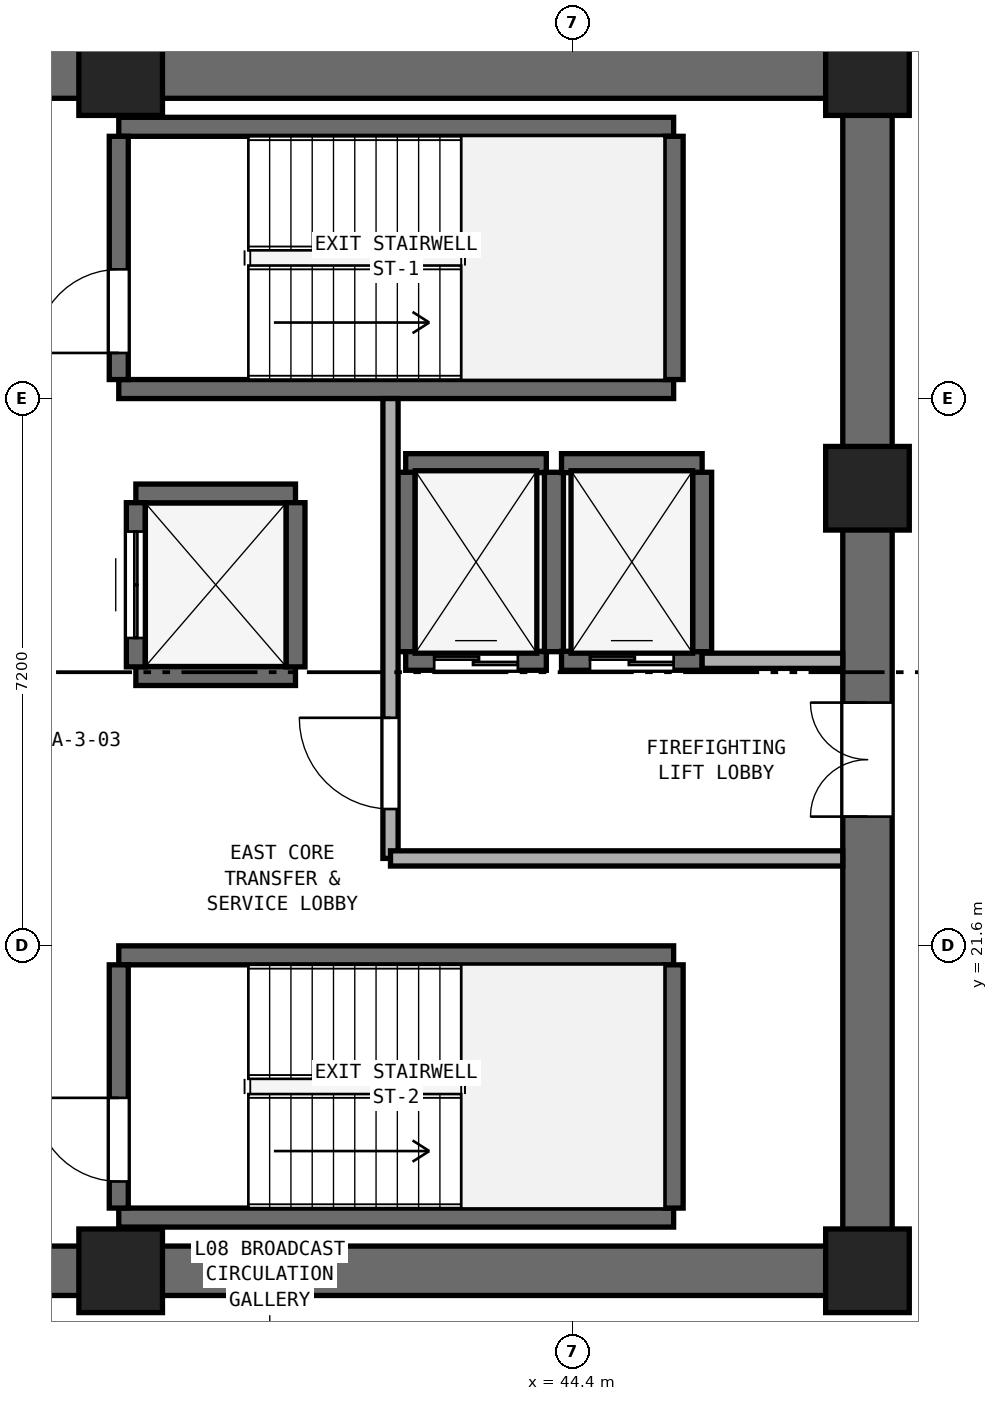
"""IFC4 building model, lengths in metres.
Left out: names, types, materials, properties, quantities, classifications, styles, units other than length and angle.
Written with IfcOpenShell. Run it as: python <this file> out.ifc"""

import sys

from ifc_helpers import new_model, si_unit, direction, frame, frame_2d, origin, origin_2d, place, context, subcontext, project, spatial, rectangle, extrude, element, fill, save


model = new_model("IFC4")
c1 = context("Model", 3, precision=1e-05, world=origin(), true_north=direction((0.0, 1.0)))
c2 = subcontext(c1, "Body", "Model", "MODEL_VIEW")
j1 = project(units=[si_unit("LENGTHUNIT", "METRE"), si_unit("PLANEANGLEUNIT", "RADIAN")], contexts=[c1])
p1 = place(None, origin())
s1 = spatial("IfcSite", under=j1, at=p1, CompositionType="ELEMENT")
p2 = place(p1, origin())
s2 = spatial("IfcBuilding", under=s1, at=p2, CompositionType="ELEMENT")
p3 = place(p2, frame((0.0, 0.0, 36.4)))
s3 = spatial("IfcBuildingStorey", under=s2, at=p3, CompositionType="ELEMENT", Elevation=36.4)
for number, where, z_axis, x_axis in (
    (1, (25.4, 17.325, 0.0), (0.0, 0.0, 1.0), (1.0, 0.0, 0.0)),
    (2, (25.4, 33.075, 0.0), (0.0, 0.0, 1.0), (1.0, 0.0, 0.0)),
):
    element("IfcWall", number, at=place(p3, frame(where, z_axis=z_axis, x_axis=x_axis)), inside=s3, PredefinedType="SHEAR", context=c2, shape_type="SweptSolid", body=[
        extrude(rectangle(XDim=23.2, YDim=0.65, at=frame_2d((11.6, 0.0))), origin(), (0.0, 0.0, 1.0), 3.525),
    ])
p4 = place(p3, frame((48.275, 17.65, 0.0), z_axis=(0.0, 0.0, 1.0), x_axis=(0.0, 1.0, 0.0)))
e3 = element("IfcWall", 3, at=p4, inside=s3, PredefinedType="SHEAR", context=c2, shape_type="SweptSolid", body=[
    extrude(rectangle(XDim=15.1, YDim=0.65, at=frame_2d((7.55, 0.0))), origin(), (0.0, 0.0, 1.0), 3.525),
])
p5 = place(p4, frame((5.65, 0.0, 0.0)))
e4 = element("IfcOpeningElement", 4, at=p5, cuts=e3, PredefinedType="OPENING", context=c2, shape_type="SweptSolid", body=[
    extrude(rectangle(XDim=1.5, YDim=2.15, at=frame_2d((0.75, 1.075))), frame((0.0, 0.335, 0.0), z_axis=(0.0, -1.0, 0.0), x_axis=(1.0, 0.0, 0.0)), (0.0, 0.0, 1.0), 0.67),
])
for number, where, z_axis, x_axis in (
    (5, (38.45, 17.325, 0.0), (0.0, 0.0, 1.0), (1.0, 0.0, 0.0)),
    (6, (48.275, 17.325, 0.0), (0.0, 0.0, 1.0), (1.0, 0.0, 0.0)),
    (7, (48.275, 27.62, 0.0), (0.0, 0.0, 1.0), (1.0, 0.0, 0.0)),
    (8, (48.275, 33.075, 0.0), (0.0, 0.0, 1.0), (1.0, 0.0, 0.0)),
    (9, (38.45, 33.075, 0.0), (0.0, 0.0, 1.0), (1.0, 0.0, 0.0)),
):
    element("IfcColumn", number, at=place(p3, frame(where, z_axis=z_axis, x_axis=x_axis)), inside=s3, PredefinedType="PILASTER", context=c2, shape_type="SweptSolid", body=[
        extrude(rectangle(XDim=1.1, YDim=1.1, at=origin_2d()), origin(), (0.0, 0.0, 1.0), 3.8),
    ])
for number, where, z_axis, x_axis in (
    (10, (38.425, 28.925, 0.0), (0.0, 0.0, 1.0), (1.0, 0.0, 0.0)),
    (11, (38.425, 32.375, 0.0), (0.0, 0.0, 1.0), (1.0, 0.0, 0.0)),
):
    element("IfcWall", number, at=place(p3, frame(where, z_axis=z_axis, x_axis=x_axis)), inside=s3, PredefinedType="SHEAR", context=c2, shape_type="SweptSolid", body=[
        extrude(rectangle(XDim=7.3, YDim=0.25, at=frame_2d((3.65, 0.0))), origin(), (0.0, 0.0, 1.0), 3.525),
    ])
p6 = place(p3, frame((38.425, 29.05, 0.0), z_axis=(0.0, 0.0, 1.0), x_axis=(0.0, 1.0, 0.0)))
e12 = element("IfcWall", 12, at=p6, inside=s3, PredefinedType="SHEAR", context=c2, shape_type="SweptSolid", body=[
    extrude(rectangle(XDim=3.2, YDim=0.25, at=frame_2d((1.6, 0.0))), origin(), (0.0, 0.0, 1.0), 3.525),
])
p7 = place(p6, frame((0.35, 0.0, 0.0)))
e13 = element("IfcOpeningElement", 13, at=p7, cuts=e12, PredefinedType="OPENING", context=c2, shape_type="SweptSolid", body=[
    extrude(rectangle(XDim=1.1, YDim=2.15, at=frame_2d((0.55, 1.075))), frame((0.0, 0.135, 0.0), z_axis=(0.0, -1.0, 0.0), x_axis=(1.0, 0.0, 0.0)), (0.0, 0.0, 1.0), 0.27),
])
p8 = place(p3, frame((45.725, 29.05, 0.0), z_axis=(0.0, 0.0, 1.0), x_axis=(0.0, 1.0, 0.0)))
e14 = element("IfcWall", 14, at=p8, inside=s3, PredefinedType="SHEAR", context=c2, shape_type="SweptSolid", body=[
    extrude(rectangle(XDim=3.2, YDim=0.25, at=frame_2d((1.6, 0.0))), origin(), (0.0, 0.0, 1.0), 3.525),
])
for number, where, z_axis, x_axis in (
    (15, (38.425, 18.025, 0.0), (0.0, 0.0, 1.0), (1.0, 0.0, 0.0)),
    (16, (38.425, 21.475, 0.0), (0.0, 0.0, 1.0), (1.0, 0.0, 0.0)),
):
    element("IfcWall", number, at=place(p3, frame(where, z_axis=z_axis, x_axis=x_axis)), inside=s3, PredefinedType="SHEAR", context=c2, shape_type="SweptSolid", body=[
        extrude(rectangle(XDim=7.3, YDim=0.25, at=frame_2d((3.65, 0.0))), origin(), (0.0, 0.0, 1.0), 3.525),
    ])
p9 = place(p3, frame((38.425, 18.15, 0.0), z_axis=(0.0, 0.0, 1.0), x_axis=(0.0, 1.0, 0.0)))
e17 = element("IfcWall", 17, at=p9, inside=s3, PredefinedType="SHEAR", context=c2, shape_type="SweptSolid", body=[
    extrude(rectangle(XDim=3.2, YDim=0.25, at=frame_2d((1.6, 0.0))), origin(), (0.0, 0.0, 1.0), 3.525),
])
p10 = place(p9, frame((0.35, 0.0, 0.0)))
e18 = element("IfcOpeningElement", 18, at=p10, cuts=e17, PredefinedType="OPENING", context=c2, shape_type="SweptSolid", body=[
    extrude(rectangle(XDim=1.1, YDim=2.15, at=frame_2d((0.55, 1.075))), frame((0.0, 0.135, 0.0), z_axis=(0.0, -1.0, 0.0), x_axis=(1.0, 0.0, 0.0)), (0.0, 0.0, 1.0), 0.27),
])
p11 = place(p3, frame((45.725, 18.15, 0.0), z_axis=(0.0, 0.0, 1.0), x_axis=(0.0, 1.0, 0.0)))
e19 = element("IfcWall", 19, at=p11, inside=s3, PredefinedType="SHEAR", context=c2, shape_type="SweptSolid", body=[
    extrude(rectangle(XDim=3.2, YDim=0.25, at=frame_2d((1.6, 0.0))), origin(), (0.0, 0.0, 1.0), 3.525),
])
p12 = place(p3, frame((42.2, 25.35, 0.0), z_axis=(0.0, 0.0, 1.0), x_axis=(1.0, 0.0, 0.0)))
e20 = element("IfcWall", 20, at=p12, inside=s3, PredefinedType="SHEAR", context=c2, shape_type="SweptSolid", body=[
    extrude(rectangle(XDim=1.85, YDim=0.25, at=frame_2d((0.925, 0.0))), origin(), (0.0, 0.0, 1.0), 3.525),
])
p13 = place(p12, frame((0.375, 0.0, 0.0)))
e21 = element("IfcOpeningElement", 21, at=p13, cuts=e20, PredefinedType="OPENING", context=c2, shape_type="SweptSolid", body=[
    extrude(rectangle(XDim=1.1, YDim=2.15, at=frame_2d((0.55, 1.075))), frame((0.0, 0.135, 0.0), z_axis=(0.0, -1.0, 0.0), x_axis=(1.0, 0.0, 0.0)), (0.0, 0.0, 1.0), 0.27),
])
p14 = place(p3, frame((42.2, 27.95, 0.0), z_axis=(0.0, 0.0, 1.0), x_axis=(1.0, 0.0, 0.0)))
e22 = element("IfcWall", 22, at=p14, inside=s3, PredefinedType="SHEAR", context=c2, shape_type="SweptSolid", body=[
    extrude(rectangle(XDim=1.85, YDim=0.25, at=frame_2d((0.925, 0.0))), origin(), (0.0, 0.0, 1.0), 3.525),
])
for number, where, z_axis, x_axis in (
    (23, (42.2, 25.47, 0.0), (0.0, 0.0, 1.0), (0.0, 1.0, 0.0)),
    (24, (44.15, 25.47, 0.0), (0.0, 0.0, 1.0), (0.0, 1.0, 0.0)),
):
    element("IfcWall", number, at=place(p3, frame(where, z_axis=z_axis, x_axis=x_axis)), inside=s3, PredefinedType="SHEAR", context=c2, shape_type="SweptSolid", body=[
        extrude(rectangle(XDim=2.36, YDim=0.25, at=frame_2d((1.18, 0.0))), origin(), (0.0, 0.0, 1.0), 3.525),
    ])
p15 = place(p3, frame((44.25, 25.35, 0.0), z_axis=(0.0, 0.0, 1.0), x_axis=(1.0, 0.0, 0.0)))
e25 = element("IfcWall", 25, at=p15, inside=s3, PredefinedType="SHEAR", context=c2, shape_type="SweptSolid", body=[
    extrude(rectangle(XDim=1.85, YDim=0.25, at=frame_2d((0.925, 0.0))), origin(), (0.0, 0.0, 1.0), 3.525),
])
p16 = place(p15, frame((0.375, 0.0, 0.0)))
e26 = element("IfcOpeningElement", 26, at=p16, cuts=e25, PredefinedType="OPENING", context=c2, shape_type="SweptSolid", body=[
    extrude(rectangle(XDim=1.1, YDim=2.15, at=frame_2d((0.55, 1.075))), frame((0.0, 0.135, 0.0), z_axis=(0.0, -1.0, 0.0), x_axis=(1.0, 0.0, 0.0)), (0.0, 0.0, 1.0), 0.27),
])
p17 = place(p3, frame((44.25, 27.95, 0.0), z_axis=(0.0, 0.0, 1.0), x_axis=(1.0, 0.0, 0.0)))
e27 = element("IfcWall", 27, at=p17, inside=s3, PredefinedType="SHEAR", context=c2, shape_type="SweptSolid", body=[
    extrude(rectangle(XDim=1.85, YDim=0.25, at=frame_2d((0.925, 0.0))), origin(), (0.0, 0.0, 1.0), 3.525),
])
p18 = place(p3, frame((46.1, 25.47, 0.0), z_axis=(0.0, 0.0, 1.0), x_axis=(0.0, 1.0, 0.0)))
e28 = element("IfcWall", 28, at=p18, inside=s3, PredefinedType="SHEAR", context=c2, shape_type="SweptSolid", body=[
    extrude(rectangle(XDim=2.36, YDim=0.25, at=frame_2d((1.18, 0.0))), origin(), (0.0, 0.0, 1.0), 3.525),
])
for number, where, z_axis, x_axis in (
    (29, (38.65, 25.15, 0.0), (0.0, 0.0, 1.0), (1.0, 0.0, 0.0)),
    (30, (38.65, 27.55, 0.0), (0.0, 0.0, 1.0), (1.0, 0.0, 0.0)),
):
    element("IfcWall", number, at=place(p3, frame(where, z_axis=z_axis, x_axis=x_axis)), inside=s3, PredefinedType="SHEAR", context=c2, shape_type="SweptSolid", body=[
        extrude(rectangle(XDim=2.1, YDim=0.25, at=frame_2d((1.05, 0.0))), origin(), (0.0, 0.0, 1.0), 3.525),
    ])
p19 = place(p3, frame((38.65, 25.27, 0.0), z_axis=(0.0, 0.0, 1.0), x_axis=(0.0, 1.0, 0.0)))
e31 = element("IfcWall", 31, at=p19, inside=s3, PredefinedType="SHEAR", context=c2, shape_type="SweptSolid", body=[
    extrude(rectangle(XDim=2.16, YDim=0.25, at=frame_2d((1.08, 0.0))), origin(), (0.0, 0.0, 1.0), 3.525),
])
p20 = place(p19, frame((0.38, 0.0, 0.0)))
e32 = element("IfcOpeningElement", 32, at=p20, cuts=e31, PredefinedType="OPENING", context=c2, shape_type="SweptSolid", body=[
    extrude(rectangle(XDim=1.4, YDim=2.2, at=frame_2d((0.7, 1.1))), frame((0.0, 0.135, 0.0), z_axis=(0.0, -1.0, 0.0), x_axis=(1.0, 0.0, 0.0)), (0.0, 0.0, 1.0), 0.27),
])
p21 = place(p3, frame((40.75, 25.27, 0.0), z_axis=(0.0, 0.0, 1.0), x_axis=(0.0, 1.0, 0.0)))
e33 = element("IfcWall", 33, at=p21, inside=s3, PredefinedType="SHEAR", context=c2, shape_type="SweptSolid", body=[
    extrude(rectangle(XDim=2.16, YDim=0.25, at=frame_2d((1.08, 0.0))), origin(), (0.0, 0.0, 1.0), 3.525),
])
p22 = place(p3, frame((42.0, 22.75, 0.0), z_axis=(0.0, 0.0, 1.0), x_axis=(0.0, 1.0, 0.0)))
e34 = element("IfcWall", 34, at=p22, inside=s3, PredefinedType="SOLIDWALL", context=c2, shape_type="SweptSolid", body=[
    extrude(rectangle(XDim=6.05, YDim=0.2, at=frame_2d((3.025, 0.0))), origin(), (0.0, 0.0, 1.0), 3.525),
])
p23 = place(p22, frame((0.65, 0.0, 0.0)))
e35 = element("IfcOpeningElement", 35, at=p23, cuts=e34, PredefinedType="OPENING", context=c2, shape_type="SweptSolid", body=[
    extrude(rectangle(XDim=1.2, YDim=2.15, at=frame_2d((0.6, 1.075))), frame((0.0, 0.11, 0.0), z_axis=(0.0, -1.0, 0.0), x_axis=(1.0, 0.0, 0.0)), (0.0, 0.0, 1.0), 0.22),
])
p24 = place(p3, frame((42.0, 22.75, 0.0), z_axis=(0.0, 0.0, 1.0), x_axis=(1.0, 0.0, 0.0)))
e36 = element("IfcWall", 36, at=p24, inside=s3, PredefinedType="SOLIDWALL", context=c2, shape_type="SweptSolid", body=[
    extrude(rectangle(XDim=5.95, YDim=0.2, at=frame_2d((2.975, 0.0))), origin(), (0.0, 0.0, 1.0), 3.525),
])
p25 = place(p3, frame((46.1, 25.35, 0.0), z_axis=(0.0, 0.0, 1.0), x_axis=(1.0, 0.0, 0.0)))
e37 = element("IfcWall", 37, at=p25, inside=s3, PredefinedType="SOLIDWALL", context=c2, shape_type="SweptSolid", body=[
    extrude(rectangle(XDim=1.85, YDim=0.2, at=frame_2d((0.925, 0.0))), origin(), (0.0, 0.0, 1.0), 3.525),
])
p26 = place(p7, origin())
e38 = element("IfcDoor", 38, at=p26, inside=s3, OperationType="SINGLE_SWING_LEFT", PredefinedType="DOOR", context=c2, shape_type="SweptSolid", body=[
    extrude(rectangle(XDim=1.1, YDim=2.15, at=frame_2d((0.55, 1.075))), frame((0.0, 0.025, 0.0), z_axis=(0.0, -1.0, 0.0), x_axis=(1.0, 0.0, 0.0)), (0.0, 0.0, 1.0), 0.05),
])
fill(e13, e38)
p27 = place(p10, origin())
e39 = element("IfcDoor", 39, at=p27, inside=s3, OperationType="SINGLE_SWING_RIGHT", PredefinedType="DOOR", context=c2, shape_type="SweptSolid", body=[
    extrude(rectangle(XDim=1.1, YDim=2.15, at=frame_2d((0.55, 1.075))), frame((0.0, 0.025, 0.0), z_axis=(0.0, -1.0, 0.0), x_axis=(1.0, 0.0, 0.0)), (0.0, 0.0, 1.0), 0.05),
])
fill(e18, e39)
p28 = place(p13, origin())
e40 = element("IfcDoor", 40, at=p28, inside=s3, OperationType="DOUBLE_DOOR_SLIDING", PredefinedType="DOOR", context=c2, shape_type="SweptSolid", body=[
    extrude(rectangle(XDim=1.1, YDim=2.15, at=frame_2d((0.55, 1.075))), frame((0.0, 0.025, 0.0), z_axis=(0.0, -1.0, 0.0), x_axis=(1.0, 0.0, 0.0)), (0.0, 0.0, 1.0), 0.05),
])
fill(e21, e40)
p29 = place(p16, origin())
e41 = element("IfcDoor", 41, at=p29, inside=s3, OperationType="DOUBLE_DOOR_SLIDING", PredefinedType="DOOR", context=c2, shape_type="SweptSolid", body=[
    extrude(rectangle(XDim=1.1, YDim=2.15, at=frame_2d((0.55, 1.075))), frame((0.0, 0.025, 0.0), z_axis=(0.0, -1.0, 0.0), x_axis=(1.0, 0.0, 0.0)), (0.0, 0.0, 1.0), 0.05),
])
fill(e26, e41)
p30 = place(p20, origin())
e42 = element("IfcDoor", 42, at=p30, inside=s3, OperationType="DOUBLE_DOOR_SLIDING", PredefinedType="DOOR", context=c2, shape_type="SweptSolid", body=[
    extrude(rectangle(XDim=1.4, YDim=2.2, at=frame_2d((0.7, 1.1))), frame((0.0, 0.025, 0.0), z_axis=(0.0, -1.0, 0.0), x_axis=(1.0, 0.0, 0.0)), (0.0, 0.0, 1.0), 0.05),
])
fill(e32, e42)
p31 = place(p23, origin())
e43 = element("IfcDoor", 43, at=p31, inside=s3, OperationType="SINGLE_SWING_RIGHT", PredefinedType="DOOR", context=c2, shape_type="SweptSolid", body=[
    extrude(rectangle(XDim=1.2, YDim=2.15, at=frame_2d((0.6, 1.075))), frame((0.0, 0.025, 0.0), z_axis=(0.0, -1.0, 0.0), x_axis=(1.0, 0.0, 0.0)), (0.0, 0.0, 1.0), 0.05),
])
fill(e35, e43)
p32 = place(p5, origin())
e44 = element("IfcDoor", 44, at=p32, inside=s3, OperationType="DOUBLE_DOOR_SINGLE_SWING", PredefinedType="DOOR", context=c2, shape_type="SweptSolid", body=[
    extrude(rectangle(XDim=1.5, YDim=2.15, at=frame_2d((0.75, 1.075))), frame((0.0, 0.025, 0.0), z_axis=(0.0, -1.0, 0.0), x_axis=(1.0, 0.0, 0.0)), (0.0, 0.0, 1.0), 0.05),
])
fill(e4, e44)
save(model, sys.argv[1])
